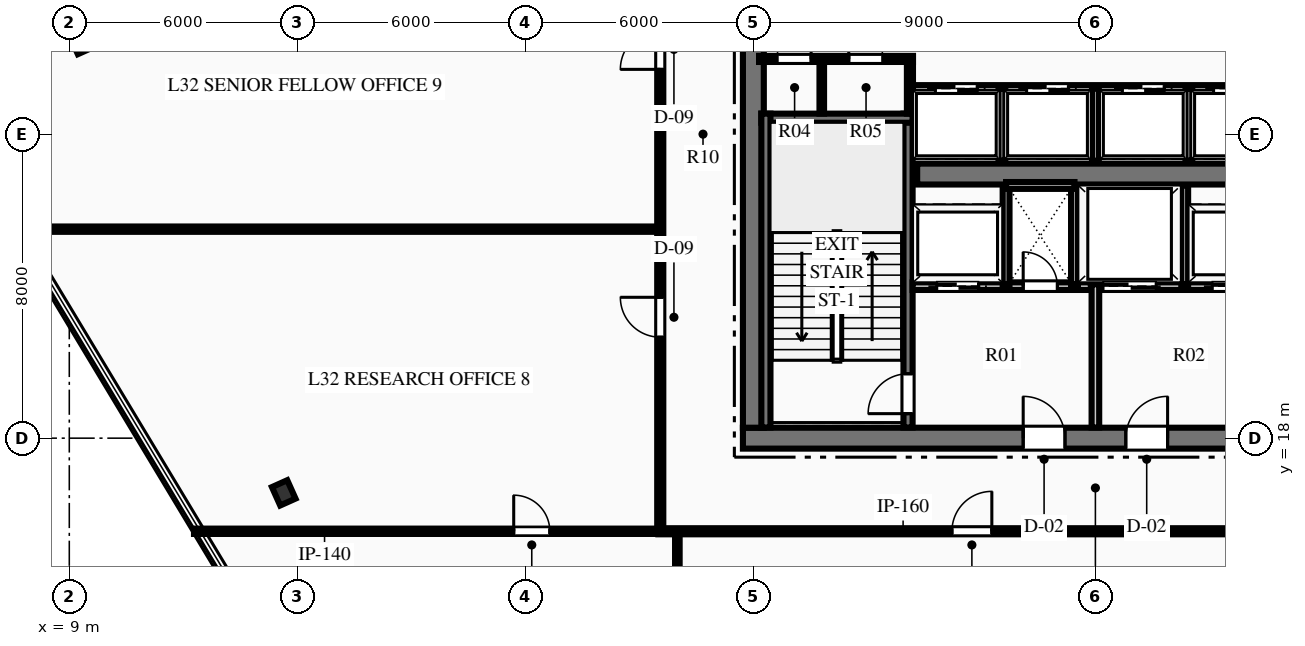
"""IFC4 building model, lengths in metres.
Left out: names, types, materials, properties, quantities, classifications, styles, units other than length and angle.
Written with IfcOpenShell. Run it as: python <this file> out.ifc"""

import sys

from ifc_helpers import new_model, si_unit, direction, frame, frame_2d, origin, origin_2d, place, context, subcontext, project, spatial, rectangle, i_section, extrude, element, fill, save


model = new_model("IFC4")
c1 = context("Model", 3, precision=1e-05, world=origin(), true_north=direction((0.0, 1.0)))
c2 = subcontext(c1, "Body", "Model", "MODEL_VIEW")
j1 = project(units=[si_unit("LENGTHUNIT", "METRE"), si_unit("PLANEANGLEUNIT", "RADIAN")], contexts=[c1])
p1 = place(None, origin())
s1 = spatial("IfcSite", under=j1, at=p1, CompositionType="ELEMENT")
p2 = place(p1, origin())
s2 = spatial("IfcBuilding", under=s1, at=p2, CompositionType="ELEMENT")
p3 = place(p2, frame((0.0, 0.0, 131.7)))
s3 = spatial("IfcBuildingStorey", under=s2, at=p3, CompositionType="ELEMENT", Elevation=131.7)
p4 = place(p3, frame((26.725, 18.0, 0.0), z_axis=(0.0, 0.0, 1.0), x_axis=(1.0, 0.0, 0.0)))
e1 = element("IfcWall", 1, at=p4, inside=s3, PredefinedType="SHEAR", context=c2, shape_type="SweptSolid", body=[
    extrude(rectangle(XDim=18.55, YDim=0.55, at=frame_2d((9.275, 0.0))), origin(), (0.0, 0.0, 1.0), 4.5),
])
p5 = place(p4, frame((7.375, 0.0, 0.0)))
e2 = element("IfcOpeningElement", 2, at=p5, cuts=e1, PredefinedType="OPENING", context=c2, shape_type="SweptSolid", body=[
    extrude(rectangle(XDim=1.1, YDim=2.15, at=frame_2d((0.55, 1.075))), frame((0.0, 0.285, 0.0), z_axis=(0.0, -1.0, 0.0), x_axis=(1.0, 0.0, 0.0)), (0.0, 0.0, 1.0), 0.57),
])
p6 = place(p4, frame((10.075, 0.0, 0.0)))
e3 = element("IfcOpeningElement", 3, at=p6, cuts=e1, PredefinedType="OPENING", context=c2, shape_type="SweptSolid", body=[
    extrude(rectangle(XDim=1.1, YDim=2.15, at=frame_2d((0.55, 1.075))), frame((0.0, 0.285, 0.0), z_axis=(0.0, -1.0, 0.0), x_axis=(1.0, 0.0, 0.0)), (0.0, 0.0, 1.0), 0.57),
])
p7 = place(p3, frame((27.0, 18.275, 0.0), z_axis=(0.0, 0.0, 1.0), x_axis=(0.0, 1.0, 0.0)))
e4 = element("IfcWall", 4, at=p7, inside=s3, PredefinedType="SHEAR", context=c2, shape_type="SweptSolid", body=[
    extrude(rectangle(XDim=15.45, YDim=0.55, at=frame_2d((7.725, 0.0))), origin(), (0.0, 0.0, 1.0), 4.5),
])
p8 = place(p7, frame((9.965, 0.0, 0.0)))
e5 = element("IfcOpeningElement", 5, at=p8, cuts=e4, PredefinedType="OPENING", context=c2, shape_type="SweptSolid", body=[
    extrude(rectangle(XDim=1.4, YDim=2.2, at=frame_2d((0.7, 1.1))), frame((0.0, 0.285, 0.0), z_axis=(0.0, -1.0, 0.0), x_axis=(1.0, 0.0, 0.0)), (0.0, 0.0, 1.0), 0.57),
])
p9 = place(p3, frame((31.31, 24.95, 0.0), z_axis=(0.0, 0.0, 1.0), x_axis=(1.0, 0.0, 0.0)))
e6 = element("IfcWall", 6, at=p9, inside=s3, PredefinedType="SHEAR", context=c2, shape_type="SweptSolid", body=[
    extrude(rectangle(XDim=9.38, YDim=0.55, at=frame_2d((4.69, 0.0))), origin(), (0.0, 0.0, 1.0), 4.5),
])
p10 = place(p3, frame((31.07, 18.28, 0.0), z_axis=(0.0, 0.0, 1.0), x_axis=(0.0, 1.0, 0.0)))
e7 = element("IfcWall", 7, at=p10, inside=s3, PredefinedType="SHEAR", context=c2, shape_type="SweptSolid", body=[
    extrude(rectangle(XDim=8.26, YDim=0.24, at=frame_2d((4.13, 0.0))), origin(), (0.0, 0.0, 1.0), 4.5),
])
p11 = place(p10, frame((0.365, 0.0, 0.0)))
e8 = element("IfcOpeningElement", 8, at=p11, cuts=e7, PredefinedType="OPENING", context=c2, shape_type="SweptSolid", body=[
    extrude(rectangle(XDim=1.05, YDim=2.15, at=frame_2d((0.525, 1.075))), frame((0.0, 0.13, 0.0), z_axis=(0.0, -1.0, 0.0), x_axis=(1.0, 0.0, 0.0)), (0.0, 0.0, 1.0), 0.26),
])
p12 = place(p3, frame((27.21, 26.42, 0.0), z_axis=(0.0, 0.0, 1.0), x_axis=(1.0, 0.0, 0.0)))
e9 = element("IfcWall", 9, at=p12, inside=s3, PredefinedType="SHEAR", context=c2, shape_type="SweptSolid", body=[
    extrude(rectangle(XDim=3.98, YDim=0.24, at=frame_2d((1.99, 0.0))), origin(), (0.0, 0.0, 1.0), 4.5),
])
p13 = place(p3, frame((27.33, 18.28, 0.0), z_axis=(0.0, 0.0, 1.0), x_axis=(0.0, 1.0, 0.0)))
e10 = element("IfcWall", 10, at=p13, inside=s3, PredefinedType="SHEAR", context=c2, shape_type="SweptSolid", body=[
    extrude(rectangle(XDim=8.26, YDim=0.24, at=frame_2d((4.13, 0.0))), origin(), (0.0, 0.0, 1.0), 4.5),
])
for number, where, z_axis, x_axis in (
    (11, (9.318, 28.437, 0.0), (0.0, 0.0, 1.0), (0.912, 0.409, 0.0)),
    (12, (14.643, 16.561, 0.0), (0.0, 0.0, 1.0), (0.912, 0.409, 0.0)),
):
    element("IfcColumn", number, at=place(p3, frame(where, z_axis=z_axis, x_axis=x_axis)), inside=s3, PredefinedType="COLUMN", context=c2, shape_type="SweptSolid", body=[
        extrude(i_section(OverallWidth=0.442, OverallDepth=0.531, WebThickness=0.066, FlangeThickness=0.106, at=origin_2d()), origin(), (0.0, 0.0, 1.0), 4.5),
    ])
p14 = place(p3, frame((36.0, 18.28, 0.0), z_axis=(0.0, 0.0, 1.0), x_axis=(0.0, 1.0, 0.0)))
e13 = element("IfcWall", 13, at=p14, inside=s3, PredefinedType="PARTITIONING", context=c2, shape_type="SweptSolid", body=[
    extrude(rectangle(XDim=3.77, YDim=0.2, at=frame_2d((1.885, 0.0))), origin(), (0.0, 0.0, 1.0), 4.1),
])
p15 = place(p3, frame((31.19, 22.0, 0.0), z_axis=(0.0, 0.0, 1.0), x_axis=(1.0, 0.0, 0.0)))
e14 = element("IfcWall", 14, at=p15, inside=s3, PredefinedType="PARTITIONING", context=c2, shape_type="SweptSolid", body=[
    extrude(rectangle(XDim=4.69, YDim=0.2, at=frame_2d((2.345, 0.0))), origin(), (0.0, 0.0, 1.0), 4.1),
])
p16 = place(p15, frame((2.91, 0.0, 0.0)))
e15 = element("IfcOpeningElement", 15, at=p16, cuts=e14, PredefinedType="OPENING", context=c2, shape_type="SweptSolid", body=[
    extrude(rectangle(XDim=0.9, YDim=2.15, at=frame_2d((0.45, 1.075))), frame((0.0, 0.11, 0.0), z_axis=(0.0, -1.0, 0.0), x_axis=(1.0, 0.0, 0.0)), (0.0, 0.0, 1.0), 0.22),
])
p17 = place(p15, frame((0.635, 0.0, 0.0)))
e16 = element("IfcOpeningElement", 16, at=p17, cuts=e14, PredefinedType="OPENING", context=c2, shape_type="SweptSolid", body=[
    extrude(rectangle(XDim=1.1, YDim=2.15, at=frame_2d((0.55, 1.075))), frame((0.0, 0.11, 0.0), z_axis=(0.0, -1.0, 0.0), x_axis=(1.0, 0.0, 0.0)), (0.0, 0.0, 1.0), 0.22),
])
p18 = place(p3, frame((36.12, 22.0, 0.0), z_axis=(0.0, 0.0, 1.0), x_axis=(1.0, 0.0, 0.0)))
e17 = element("IfcWall", 17, at=p18, inside=s3, PredefinedType="PARTITIONING", context=c2, shape_type="SweptSolid", body=[
    extrude(rectangle(XDim=4.69, YDim=0.2, at=frame_2d((2.345, 0.0))), origin(), (0.0, 0.0, 1.0), 4.1),
])
p19 = place(p18, frame((2.955, 0.0, 0.0)))
e18 = element("IfcOpeningElement", 18, at=p19, cuts=e17, PredefinedType="OPENING", context=c2, shape_type="SweptSolid", body=[
    extrude(rectangle(XDim=1.1, YDim=2.15, at=frame_2d((0.55, 1.075))), frame((0.0, 0.11, 0.0), z_axis=(0.0, -1.0, 0.0), x_axis=(1.0, 0.0, 0.0)), (0.0, 0.0, 1.0), 0.22),
])
p20 = place(p18, frame((0.08, 0.0, 0.0)))
e19 = element("IfcOpeningElement", 19, at=p20, cuts=e17, PredefinedType="OPENING", context=c2, shape_type="SweptSolid", body=[
    extrude(rectangle(XDim=1.4, YDim=2.2, at=frame_2d((0.7, 1.1))), frame((0.0, 0.11, 0.0), z_axis=(0.0, -1.0, 0.0), x_axis=(1.0, 0.0, 0.0)), (0.0, 0.0, 1.0), 0.22),
])
for number, where, z_axis, x_axis in (
    (20, (33.65, 22.05, 0.0), (0.0, 0.0, 1.0), (0.0, 1.0, 0.0)),
    (21, (35.45, 22.05, 0.0), (0.0, 0.0, 1.0), (0.0, 1.0, 0.0)),
):
    element("IfcWall", number, at=place(p3, frame(where, z_axis=z_axis, x_axis=x_axis)), inside=s3, PredefinedType="PARTITIONING", context=c2, shape_type="SweptSolid", body=[
        extrude(rectangle(XDim=2.6, YDim=0.18, at=frame_2d((1.3, 0.0))), origin(), (0.0, 0.0, 1.0), 4.1),
    ])
p21 = place(p3, frame((33.65, 24.65, 0.0), z_axis=(0.0, 0.0, 1.0), x_axis=(1.0, 0.0, 0.0)))
e22 = element("IfcWall", 22, at=p21, inside=s3, PredefinedType="PARTITIONING", context=c2, shape_type="SweptSolid", body=[
    extrude(rectangle(XDim=1.8, YDim=0.18, at=frame_2d((0.9, 0.0))), origin(), (0.0, 0.0, 1.0), 4.1),
])
p22 = place(p3, frame((38.35, 22.05, 0.0), z_axis=(0.0, 0.0, 1.0), x_axis=(0.0, 1.0, 0.0)))
e23 = element("IfcWall", 23, at=p22, inside=s3, PredefinedType="PARTITIONING", context=c2, shape_type="SweptSolid", body=[
    extrude(rectangle(XDim=2.6, YDim=0.18, at=frame_2d((1.3, 0.0))), origin(), (0.0, 0.0, 1.0), 4.1),
])
p23 = place(p3, frame((27.15, 27.98, 0.0), z_axis=(0.0, 0.0, 1.0), x_axis=(1.0, 0.0, 0.0)))
e24 = element("IfcWall", 24, at=p23, inside=s3, PredefinedType="PARTITIONING", context=c2, shape_type="SweptSolid", body=[
    extrude(rectangle(XDim=4.05, YDim=0.16, at=frame_2d((2.025, 0.0))), origin(), (0.0, 0.0, 1.0), 4.1),
])
p24 = place(p23, frame((0.47, 0.0, 0.0)))
e25 = element("IfcOpeningElement", 25, at=p24, cuts=e24, PredefinedType="OPENING", context=c2, shape_type="SweptSolid", body=[
    extrude(rectangle(XDim=0.9, YDim=2.15, at=frame_2d((0.45, 1.075))), frame((0.0, 0.09, 0.0), z_axis=(0.0, -1.0, 0.0), x_axis=(1.0, 0.0, 0.0)), (0.0, 0.0, 1.0), 0.18),
])
p25 = place(p23, frame((2.36, 0.0, 0.0)))
e26 = element("IfcOpeningElement", 26, at=p25, cuts=e24, PredefinedType="OPENING", context=c2, shape_type="SweptSolid", body=[
    extrude(rectangle(XDim=0.9, YDim=2.15, at=frame_2d((0.45, 1.075))), frame((0.0, 0.09, 0.0), z_axis=(0.0, -1.0, 0.0), x_axis=(1.0, 0.0, 0.0)), (0.0, 0.0, 1.0), 0.18),
])
p26 = place(p3, frame((31.12, 26.54, 0.0), z_axis=(0.0, 0.0, 1.0), x_axis=(0.0, 1.0, 0.0)))
e27 = element("IfcWall", 27, at=p26, inside=s3, PredefinedType="PARTITIONING", context=c2, shape_type="SweptSolid", body=[
    extrude(rectangle(XDim=1.51, YDim=0.16, at=frame_2d((0.755, 0.0))), origin(), (0.0, 0.0, 1.0), 4.1),
])
p27 = place(p3, frame((28.8, 26.54, 0.0), z_axis=(0.0, 0.0, 1.0), x_axis=(0.0, 1.0, 0.0)))
e28 = element("IfcWall", 28, at=p27, inside=s3, PredefinedType="PARTITIONING", context=c2, shape_type="SweptSolid", body=[
    extrude(rectangle(XDim=1.44, YDim=0.12, at=frame_2d((0.72, 0.0))), origin(), (0.0, 0.0, 1.0), 4.1),
])
p28 = place(p3, frame((31.2, 27.2, 0.0), z_axis=(0.0, 0.0, 1.0), x_axis=(1.0, 0.0, 0.0)))
e29 = element("IfcWall", 29, at=p28, inside=s3, PredefinedType="PARTITIONING", context=c2, shape_type="SweptSolid", body=[
    extrude(rectangle(XDim=9.6, YDim=0.18, at=frame_2d((4.8, 0.0))), origin(), (0.0, 0.0, 1.0), 4.1),
])
p29 = place(p28, frame((0.59, 0.0, 0.0)))
e30 = element("IfcOpeningElement", 30, at=p29, cuts=e29, PredefinedType="OPENING", context=c2, shape_type="SweptSolid", body=[
    extrude(rectangle(XDim=1.1, YDim=2.15, at=frame_2d((0.55, 1.075))), frame((0.0, 0.1, 0.0), z_axis=(0.0, -1.0, 0.0), x_axis=(1.0, 0.0, 0.0)), (0.0, 0.0, 1.0), 0.2),
])
p30 = place(p28, frame((2.99, 0.0, 0.0)))
e31 = element("IfcOpeningElement", 31, at=p30, cuts=e29, PredefinedType="OPENING", context=c2, shape_type="SweptSolid", body=[
    extrude(rectangle(XDim=1.1, YDim=2.15, at=frame_2d((0.55, 1.075))), frame((0.0, 0.1, 0.0), z_axis=(0.0, -1.0, 0.0), x_axis=(1.0, 0.0, 0.0)), (0.0, 0.0, 1.0), 0.2),
])
p31 = place(p28, frame((5.51, 0.0, 0.0)))
e32 = element("IfcOpeningElement", 32, at=p31, cuts=e29, PredefinedType="OPENING", context=c2, shape_type="SweptSolid", body=[
    extrude(rectangle(XDim=1.1, YDim=2.15, at=frame_2d((0.55, 1.075))), frame((0.0, 0.1, 0.0), z_axis=(0.0, -1.0, 0.0), x_axis=(1.0, 0.0, 0.0)), (0.0, 0.0, 1.0), 0.2),
])
p32 = place(p28, frame((7.91, 0.0, 0.0)))
e33 = element("IfcOpeningElement", 33, at=p32, cuts=e29, PredefinedType="OPENING", context=c2, shape_type="SweptSolid", body=[
    extrude(rectangle(XDim=1.1, YDim=2.15, at=frame_2d((0.55, 1.075))), frame((0.0, 0.1, 0.0), z_axis=(0.0, -1.0, 0.0), x_axis=(1.0, 0.0, 0.0)), (0.0, 0.0, 1.0), 0.2),
])
for number, where, z_axis, x_axis in (
    (34, (33.54, 25.3, 0.0), (0.0, 0.0, 1.0), (0.0, 1.0, 0.0)),
    (35, (36.0, 25.3, 0.0), (0.0, 0.0, 1.0), (0.0, 1.0, 0.0)),
    (36, (38.46, 25.3, 0.0), (0.0, 0.0, 1.0), (0.0, 1.0, 0.0)),
):
    element("IfcWall", number, at=place(p3, frame(where, z_axis=z_axis, x_axis=x_axis)), inside=s3, PredefinedType="PARTITIONING", context=c2, shape_type="SweptSolid", body=[
        extrude(rectangle(XDim=1.9, YDim=0.18, at=frame_2d((0.95, 0.0))), origin(), (0.0, 0.0, 1.0), 4.1),
    ])
p33 = place(p3, frame((24.5, 15.55, 0.0), z_axis=(0.0, 0.0, 1.0), x_axis=(1.0, 0.0, 0.0)))
e37 = element("IfcWall", 37, at=p33, inside=s3, PredefinedType="PARTITIONING", context=c2, shape_type="SweptSolid", body=[
    extrude(rectangle(XDim=23.0, YDim=0.16, at=frame_2d((11.5, 0.0))), origin(), (0.0, 0.0, 1.0), 4.1),
])
p34 = place(p33, frame((7.725, 0.0, 0.0)))
e38 = element("IfcOpeningElement", 38, at=p34, cuts=e37, PredefinedType="OPENING", context=c2, shape_type="SweptSolid", body=[
    extrude(rectangle(XDim=1.05, YDim=2.15, at=frame_2d((0.525, 1.075))), frame((0.0, 0.09, 0.0), z_axis=(0.0, -1.0, 0.0), x_axis=(1.0, 0.0, 0.0)), (0.0, 0.0, 1.0), 0.18),
])
p35 = place(p33, frame((17.489, 0.0, 0.0)))
e39 = element("IfcOpeningElement", 39, at=p35, cuts=e37, PredefinedType="OPENING", context=c2, shape_type="SweptSolid", body=[
    extrude(rectangle(XDim=1.05, YDim=2.15, at=frame_2d((0.525, 1.075))), frame((0.0, 0.09, 0.0), z_axis=(0.0, -1.0, 0.0), x_axis=(1.0, 0.0, 0.0)), (0.0, 0.0, 1.0), 0.18),
])
p36 = place(p3, frame((24.55, 15.55, 0.0), z_axis=(0.0, 0.0, 1.0), x_axis=(0.0, 1.0, 0.0)))
e40 = element("IfcWall", 40, at=p36, inside=s3, PredefinedType="PARTITIONING", context=c2, shape_type="SweptSolid", body=[
    extrude(rectangle(XDim=20.9, YDim=0.16, at=frame_2d((10.45, 0.0))), origin(), (0.0, 0.0, 1.0), 4.1),
])
p37 = place(p36, frame((5.107, 0.0, 0.0)))
e41 = element("IfcOpeningElement", 41, at=p37, cuts=e40, PredefinedType="OPENING", context=c2, shape_type="SweptSolid", body=[
    extrude(rectangle(XDim=1.05, YDim=2.15, at=frame_2d((0.525, 1.075))), frame((0.0, 0.09, 0.0), z_axis=(0.0, -1.0, 0.0), x_axis=(1.0, 0.0, 0.0)), (0.0, 0.0, 1.0), 0.18),
])
p38 = place(p36, frame((12.155, 0.0, 0.0)))
e42 = element("IfcOpeningElement", 42, at=p38, cuts=e40, PredefinedType="OPENING", context=c2, shape_type="SweptSolid", body=[
    extrude(rectangle(XDim=1.05, YDim=2.15, at=frame_2d((0.525, 1.075))), frame((0.0, 0.09, 0.0), z_axis=(0.0, -1.0, 0.0), x_axis=(1.0, 0.0, 0.0)), (0.0, 0.0, 1.0), 0.18),
])
p39 = place(p36, frame((16.443, 0.0, 0.0)))
e43 = element("IfcOpeningElement", 43, at=p39, cuts=e40, PredefinedType="OPENING", context=c2, shape_type="SweptSolid", body=[
    extrude(rectangle(XDim=1.05, YDim=2.15, at=frame_2d((0.525, 1.075))), frame((0.0, 0.09, 0.0), z_axis=(0.0, -1.0, 0.0), x_axis=(1.0, 0.0, 0.0)), (0.0, 0.0, 1.0), 0.18),
])
p40 = place(p3, frame((12.281, 15.55, 0.0), z_axis=(0.0, 0.0, 1.0), x_axis=(1.0, 0.0, 0.0)))
e44 = element("IfcWall", 44, at=p40, inside=s3, PredefinedType="PARTITIONING", context=c2, shape_type="SweptSolid", body=[
    extrude(rectangle(XDim=12.269, YDim=0.14, at=frame_2d((6.134, 0.0))), origin(), (0.0, 0.0, 1.0), 4.1),
])
p41 = place(p40, frame((8.413, 0.0, 0.0)))
e45 = element("IfcOpeningElement", 45, at=p41, cuts=e44, PredefinedType="OPENING", context=c2, shape_type="SweptSolid", body=[
    extrude(rectangle(XDim=0.95, YDim=2.15, at=frame_2d((0.475, 1.075))), frame((0.0, 0.08, 0.0), z_axis=(0.0, -1.0, 0.0), x_axis=(1.0, 0.0, 0.0)), (0.0, 0.0, 1.0), 0.16),
])
p42 = place(p3, frame((25.0, -4.183, 0.0), z_axis=(0.0, 0.0, 1.0), x_axis=(0.0, 1.0, 0.0)))
e46 = element("IfcWall", 46, at=p42, inside=s3, PredefinedType="PARTITIONING", context=c2, shape_type="SweptSolid", body=[
    extrude(rectangle(XDim=19.733, YDim=0.12, at=frame_2d((9.867, 0.0))), origin(), (0.0, 0.0, 1.0), 4.1),
])
p43 = place(p3, frame((7.495, 23.5, 0.0), z_axis=(0.0, 0.0, 1.0), x_axis=(1.0, 0.0, 0.0)))
e47 = element("IfcWall", 47, at=p43, inside=s3, PredefinedType="PARTITIONING", context=c2, shape_type="SweptSolid", body=[
    extrude(rectangle(XDim=17.055, YDim=0.14, at=frame_2d((8.527, 0.0))), origin(), (0.0, 0.0, 1.0), 4.1),
])
p44 = place(p24, origin())
e48 = element("IfcDoor", 48, at=p44, inside=s3, OperationType="SINGLE_SWING_RIGHT", PredefinedType="DOOR", context=c2, shape_type="SweptSolid", body=[
    extrude(rectangle(XDim=0.9, YDim=2.15, at=frame_2d((0.45, 1.075))), frame((0.0, 0.025, 0.0), z_axis=(0.0, -1.0, 0.0), x_axis=(1.0, 0.0, 0.0)), (0.0, 0.0, 1.0), 0.05),
])
fill(e25, e48)
p45 = place(p25, origin())
e49 = element("IfcDoor", 49, at=p45, inside=s3, OperationType="SINGLE_SWING_LEFT", PredefinedType="DOOR", context=c2, shape_type="SweptSolid", body=[
    extrude(rectangle(XDim=0.9, YDim=2.15, at=frame_2d((0.45, 1.075))), frame((0.0, 0.025, 0.0), z_axis=(0.0, -1.0, 0.0), x_axis=(1.0, 0.0, 0.0)), (0.0, 0.0, 1.0), 0.05),
])
fill(e26, e49)
p46 = place(p11, origin())
e50 = element("IfcDoor", 50, at=p46, inside=s3, OperationType="SINGLE_SWING_LEFT", PredefinedType="DOOR", context=c2, shape_type="SweptSolid", body=[
    extrude(rectangle(XDim=1.05, YDim=2.15, at=frame_2d((0.525, 1.075))), frame((0.0, 0.025, 0.0), z_axis=(0.0, -1.0, 0.0), x_axis=(1.0, 0.0, 0.0)), (0.0, 0.0, 1.0), 0.05),
])
fill(e8, e50)
p47 = place(p5, origin())
e51 = element("IfcDoor", 51, at=p47, inside=s3, OperationType="SINGLE_SWING_LEFT", PredefinedType="DOOR", context=c2, shape_type="SweptSolid", body=[
    extrude(rectangle(XDim=1.1, YDim=2.15, at=frame_2d((0.55, 1.075))), frame((0.0, 0.025, 0.0), z_axis=(0.0, -1.0, 0.0), x_axis=(1.0, 0.0, 0.0)), (0.0, 0.0, 1.0), 0.05),
])
fill(e2, e51)
p48 = place(p6, origin())
e52 = element("IfcDoor", 52, at=p48, inside=s3, OperationType="SINGLE_SWING_RIGHT", PredefinedType="DOOR", context=c2, shape_type="SweptSolid", body=[
    extrude(rectangle(XDim=1.1, YDim=2.15, at=frame_2d((0.55, 1.075))), frame((0.0, 0.025, 0.0), z_axis=(0.0, -1.0, 0.0), x_axis=(1.0, 0.0, 0.0)), (0.0, 0.0, 1.0), 0.05),
])
fill(e3, e52)
p49 = place(p16, origin())
e53 = element("IfcDoor", 53, at=p49, inside=s3, OperationType="SINGLE_SWING_LEFT", PredefinedType="DOOR", context=c2, shape_type="SweptSolid", body=[
    extrude(rectangle(XDim=0.9, YDim=2.15, at=frame_2d((0.45, 1.075))), frame((0.0, 0.025, 0.0), z_axis=(0.0, -1.0, 0.0), x_axis=(1.0, 0.0, 0.0)), (0.0, 0.0, 1.0), 0.05),
])
fill(e15, e53)
p50 = place(p41, origin())
e54 = element("IfcDoor", 54, at=p50, inside=s3, OperationType="SINGLE_SWING_LEFT", PredefinedType="DOOR", context=c2, shape_type="SweptSolid", body=[
    extrude(rectangle(XDim=0.95, YDim=2.15, at=frame_2d((0.475, 1.075))), frame((0.0, 0.025, 0.0), z_axis=(0.0, -1.0, 0.0), x_axis=(1.0, 0.0, 0.0)), (0.0, 0.0, 1.0), 0.05),
])
fill(e45, e54)
p51 = place(p34, origin())
e55 = element("IfcDoor", 55, at=p51, inside=s3, OperationType="SINGLE_SWING_RIGHT", PredefinedType="DOOR", context=c2, shape_type="SweptSolid", body=[
    extrude(rectangle(XDim=1.05, YDim=2.15, at=frame_2d((0.525, 1.075))), frame((0.0, 0.025, 0.0), z_axis=(0.0, -1.0, 0.0), x_axis=(1.0, 0.0, 0.0)), (0.0, 0.0, 1.0), 0.05),
])
fill(e38, e55)
p52 = place(p37, origin())
e56 = element("IfcDoor", 56, at=p52, inside=s3, OperationType="SINGLE_SWING_RIGHT", PredefinedType="DOOR", context=c2, shape_type="SweptSolid", body=[
    extrude(rectangle(XDim=1.05, YDim=2.15, at=frame_2d((0.525, 1.075))), frame((0.0, 0.025, 0.0), z_axis=(0.0, -1.0, 0.0), x_axis=(1.0, 0.0, 0.0)), (0.0, 0.0, 1.0), 0.05),
])
fill(e41, e56)
p53 = place(p38, origin())
e57 = element("IfcDoor", 57, at=p53, inside=s3, OperationType="SINGLE_SWING_LEFT", PredefinedType="DOOR", context=c2, shape_type="SweptSolid", body=[
    extrude(rectangle(XDim=1.05, YDim=2.15, at=frame_2d((0.525, 1.075))), frame((0.0, 0.025, 0.0), z_axis=(0.0, -1.0, 0.0), x_axis=(1.0, 0.0, 0.0)), (0.0, 0.0, 1.0), 0.05),
])
fill(e42, e57)
p54 = place(p29, origin())
e58 = element("IfcDoor", 58, at=p54, inside=s3, OperationType="SLIDING_TO_LEFT", PredefinedType="DOOR", context=c2, shape_type="SweptSolid", body=[
    extrude(rectangle(XDim=1.1, YDim=2.15, at=frame_2d((0.55, 1.075))), frame((0.0, 0.025, 0.0), z_axis=(0.0, -1.0, 0.0), x_axis=(1.0, 0.0, 0.0)), (0.0, 0.0, 1.0), 0.05),
])
fill(e30, e58)
p55 = place(p30, origin())
e59 = element("IfcDoor", 59, at=p55, inside=s3, OperationType="SLIDING_TO_LEFT", PredefinedType="DOOR", context=c2, shape_type="SweptSolid", body=[
    extrude(rectangle(XDim=1.1, YDim=2.15, at=frame_2d((0.55, 1.075))), frame((0.0, 0.025, 0.0), z_axis=(0.0, -1.0, 0.0), x_axis=(1.0, 0.0, 0.0)), (0.0, 0.0, 1.0), 0.05),
])
fill(e31, e59)
p56 = place(p31, origin())
e60 = element("IfcDoor", 60, at=p56, inside=s3, OperationType="SLIDING_TO_LEFT", PredefinedType="DOOR", context=c2, shape_type="SweptSolid", body=[
    extrude(rectangle(XDim=1.1, YDim=2.15, at=frame_2d((0.55, 1.075))), frame((0.0, 0.025, 0.0), z_axis=(0.0, -1.0, 0.0), x_axis=(1.0, 0.0, 0.0)), (0.0, 0.0, 1.0), 0.05),
])
fill(e32, e60)
p57 = place(p32, origin())
e61 = element("IfcDoor", 61, at=p57, inside=s3, OperationType="SLIDING_TO_LEFT", PredefinedType="DOOR", context=c2, shape_type="SweptSolid", body=[
    extrude(rectangle(XDim=1.1, YDim=2.15, at=frame_2d((0.55, 1.075))), frame((0.0, 0.025, 0.0), z_axis=(0.0, -1.0, 0.0), x_axis=(1.0, 0.0, 0.0)), (0.0, 0.0, 1.0), 0.05),
])
fill(e33, e61)
p58 = place(p17, origin())
e62 = element("IfcDoor", 62, at=p58, inside=s3, OperationType="SLIDING_TO_LEFT", PredefinedType="DOOR", context=c2, shape_type="SweptSolid", body=[
    extrude(rectangle(XDim=1.1, YDim=2.15, at=frame_2d((0.55, 1.075))), frame((0.0, 0.025, 0.0), z_axis=(0.0, -1.0, 0.0), x_axis=(1.0, 0.0, 0.0)), (0.0, 0.0, 1.0), 0.05),
])
fill(e16, e62)
p59 = place(p19, origin())
e63 = element("IfcDoor", 63, at=p59, inside=s3, OperationType="SLIDING_TO_LEFT", PredefinedType="DOOR", context=c2, shape_type="SweptSolid", body=[
    extrude(rectangle(XDim=1.1, YDim=2.15, at=frame_2d((0.55, 1.075))), frame((0.0, 0.025, 0.0), z_axis=(0.0, -1.0, 0.0), x_axis=(1.0, 0.0, 0.0)), (0.0, 0.0, 1.0), 0.05),
])
fill(e18, e63)
p60 = place(p20, origin())
e64 = element("IfcDoor", 64, at=p60, inside=s3, OperationType="SLIDING_TO_LEFT", PredefinedType="DOOR", context=c2, shape_type="SweptSolid", body=[
    extrude(rectangle(XDim=1.4, YDim=2.2, at=frame_2d((0.7, 1.1))), frame((0.0, 0.025, 0.0), z_axis=(0.0, -1.0, 0.0), x_axis=(1.0, 0.0, 0.0)), (0.0, 0.0, 1.0), 0.05),
])
fill(e19, e64)
save(model, sys.argv[1])
